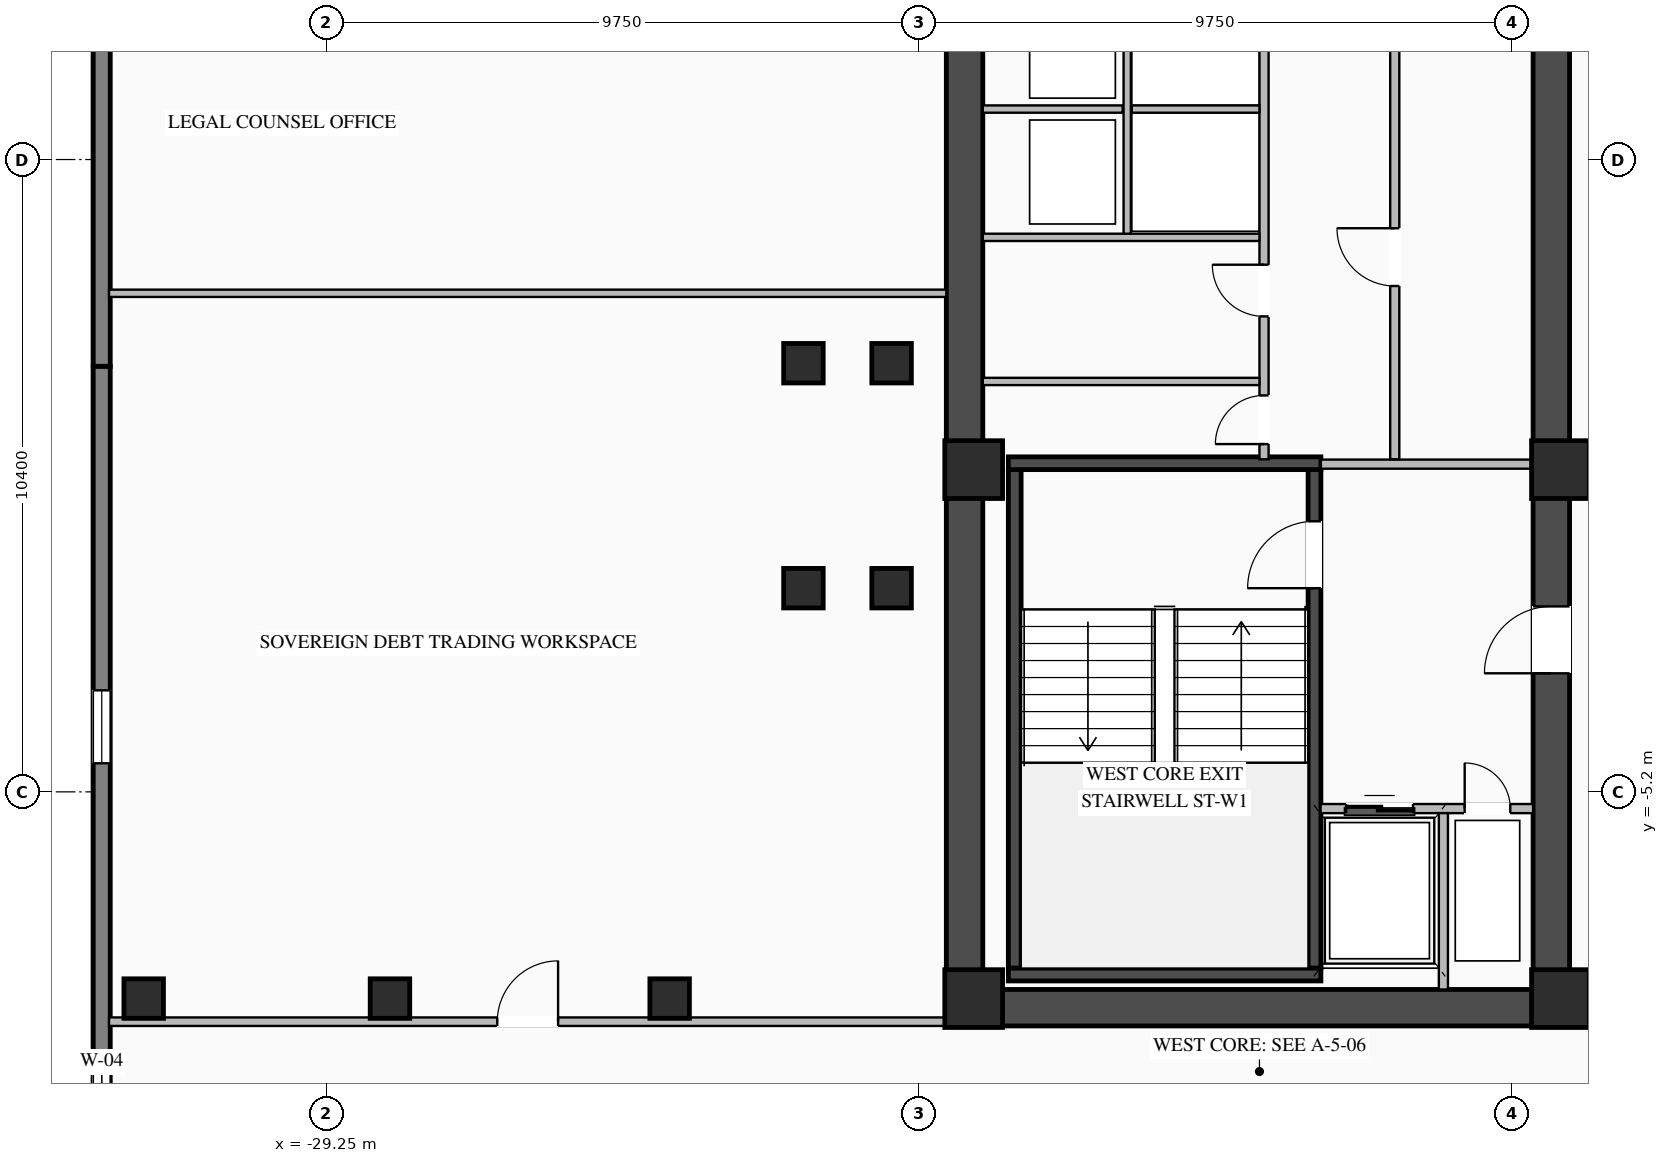
"""IFC4 building model, lengths in metres.
Left out: names, types, materials, properties, quantities, classifications, styles, units other than length and angle.
Written with IfcOpenShell. Run it as: python <this file> out.ifc"""

import sys

from ifc_helpers import new_model, si_unit, direction, frame, frame_2d, origin, origin_2d, place, context, subcontext, project, spatial, rectangle, i_section, extrude, element, fill, save


model = new_model("IFC4")
c1 = context("Model", 3, precision=1e-05, world=origin(), true_north=direction((0.0, 1.0)))
c2 = subcontext(c1, "Body", "Model", "MODEL_VIEW")
j1 = project(units=[si_unit("LENGTHUNIT", "METRE"), si_unit("PLANEANGLEUNIT", "RADIAN")], contexts=[c1])
p1 = place(None, origin())
s1 = spatial("IfcSite", under=j1, at=p1, CompositionType="ELEMENT")
p2 = place(p1, origin())
s2 = spatial("IfcBuilding", under=s1, at=p2, CompositionType="ELEMENT")
p3 = place(p2, frame((0.0, 0.0, 120.85)))
s3 = spatial("IfcBuildingStorey", under=s2, at=p3, CompositionType="ELEMENT", Elevation=120.85)
p4 = place(p3, frame((-19.05, -8.75, 0.0), z_axis=(0.0, 0.0, 1.0), x_axis=(1.0, 0.0, 0.0)))
e1 = element("IfcWall", 1, at=p4, inside=s3, PredefinedType="SHEAR", context=c2, shape_type="SweptSolid", body=[
    extrude(rectangle(XDim=10.25, YDim=0.6, at=frame_2d((5.125, 0.0))), origin(), (0.0, 0.0, 1.0), 3.27),
])
p5 = place(p3, frame((-18.75, -8.45, 0.0), z_axis=(0.0, 0.0, 1.0), x_axis=(0.0, 1.0, 0.0)))
e2 = element("IfcWall", 2, at=p5, inside=s3, PredefinedType="SHEAR", context=c2, shape_type="SweptSolid", body=[
    extrude(rectangle(XDim=16.9, YDim=0.6, at=frame_2d((8.45, 0.0))), origin(), (0.0, 0.0, 1.0), 3.27),
])
p6 = place(p3, frame((-9.1, -8.45, 0.0), z_axis=(0.0, 0.0, 1.0), x_axis=(0.0, 1.0, 0.0)))
e3 = element("IfcWall", 3, at=p6, inside=s3, PredefinedType="SHEAR", context=c2, shape_type="SweptSolid", body=[
    extrude(rectangle(XDim=16.9, YDim=0.6, at=frame_2d((8.45, 0.0))), origin(), (0.0, 0.0, 1.0), 3.27),
])
p7 = place(p6, frame((5.2, 0.0, 0.0)))
e4 = element("IfcOpeningElement", 4, at=p7, cuts=e3, PredefinedType="OPENING", context=c2, shape_type="SweptSolid", body=[
    extrude(rectangle(XDim=1.1, YDim=2.08, at=frame_2d((0.55, 1.04))), frame((0.0, 0.31, 0.0), z_axis=(0.0, -1.0, 0.0), x_axis=(1.0, 0.0, 0.0)), (0.0, 0.0, 1.0), 0.62),
])
p8 = place(p3, frame((-12.995, -8.1, 0.0), z_axis=(0.0, 0.0, 1.0), x_axis=(0.0, 1.0, 0.0)))
e5 = element("IfcWall", 5, at=p8, inside=s3, PredefinedType="SHEAR", context=c2, shape_type="SweptSolid", body=[
    extrude(rectangle(XDim=8.2, YDim=0.21, at=frame_2d((4.1, 0.0))), origin(), (0.0, 0.0, 1.0), 3.27),
])
p9 = place(p8, frame((6.25, 0.0, 0.0)))
e6 = element("IfcOpeningElement", 6, at=p9, cuts=e5, PredefinedType="OPENING", context=c2, shape_type="SweptSolid", body=[
    extrude(rectangle(XDim=1.1, YDim=2.15, at=frame_2d((0.55, 1.075))), frame((0.0, 0.115, 0.0), z_axis=(0.0, -1.0, 0.0), x_axis=(1.0, 0.0, 0.0)), (0.0, 0.0, 1.0), 0.23),
])
p10 = place(p3, frame((-17.925, -8.1, 0.0), z_axis=(0.0, 0.0, 1.0), x_axis=(0.0, 1.0, 0.0)))
e7 = element("IfcWall", 7, at=p10, inside=s3, PredefinedType="SHEAR", context=c2, shape_type="SweptSolid", body=[
    extrude(rectangle(XDim=8.2, YDim=0.21, at=frame_2d((4.1, 0.0))), origin(), (0.0, 0.0, 1.0), 3.27),
])
for number, where, z_axis, x_axis in (
    (8, (-18.03, -8.205, 0.0), (0.0, 0.0, 1.0), (1.0, 0.0, 0.0)),
    (9, (-12.89, 0.205, 0.0), (0.0, 0.0, 1.0), (-1.0, 0.0, 0.0)),
):
    element("IfcWall", number, at=place(p3, frame(where, z_axis=z_axis, x_axis=x_axis)), inside=s3, PredefinedType="SHEAR", context=c2, shape_type="SweptSolid", body=[
        extrude(rectangle(XDim=5.14, YDim=0.21, at=frame_2d((2.57, 0.0))), origin(), (0.0, 0.0, 1.0), 3.27),
    ])
for number, where, z_axis, x_axis in (
    (10, (-8.95, -8.6, 0.0), (0.0, 0.0, 1.0), (1.0, 0.0, 0.0)),
    (11, (-8.95, 0.1, 0.0), (0.0, 0.0, 1.0), (1.0, 0.0, 0.0)),
    (12, (-18.6, -8.6, 0.0), (0.0, 0.0, 1.0), (1.0, 0.0, 0.0)),
    (13, (-18.6, 0.1, 0.0), (0.0, 0.0, 1.0), (1.0, 0.0, 0.0)),
):
    element("IfcColumn", number, at=place(p3, frame(where, z_axis=z_axis, x_axis=x_axis)), inside=s3, PredefinedType="COLUMN", context=c2, shape_type="SweptSolid", body=[
        extrude(rectangle(XDim=0.95, YDim=0.95, at=origin_2d()), origin(), (0.0, 0.0, 1.0), 3.45),
    ])
for number, where, z_axis, x_axis in (
    (14, (-21.4, -1.85, 0.0), (0.0, 0.0, 1.0), (1.0, 0.0, 0.0)),
    (15, (-21.4, 1.85, 0.0), (0.0, 0.0, 1.0), (1.0, 0.0, 0.0)),
    (16, (-19.95, -1.85, 0.0), (0.0, 0.0, 1.0), (1.0, 0.0, 0.0)),
    (17, (-19.95, 1.85, 0.0), (0.0, 0.0, 1.0), (1.0, 0.0, 0.0)),
    (18, (-23.6, -8.6, 0.0), (0.0, 0.0, 1.0), (1.0, 0.0, 0.0)),
    (19, (-28.2, -8.6, 0.0), (0.0, 0.0, 1.0), (1.0, 0.0, 0.0)),
    (20, (-32.25, -8.6, 0.0), (0.0, 0.0, 1.0), (1.0, 0.0, 0.0)),
):
    element("IfcColumn", number, at=place(p3, frame(where, z_axis=z_axis, x_axis=x_axis)), inside=s3, PredefinedType="COLUMN", context=c2, shape_type="SweptSolid", body=[
        extrude(i_section(OverallWidth=0.65, OverallDepth=0.65, WebThickness=0.028, FlangeThickness=0.04, at=origin_2d()), origin(), (0.0, 0.0, 1.0), 3.45),
    ])
p11 = place(p3, frame((-32.94, -15.99, 0.0), z_axis=(0.0, 0.0, 1.0), x_axis=(0.0, 1.0, 0.0)))
e21 = element("IfcWall", 21, at=p11, inside=s3, PredefinedType="STANDARD", context=c2, shape_type="SweptSolid", body=[
    extrude(rectangle(XDim=17.79, YDim=0.28, at=frame_2d((8.895, 0.0))), origin(), (0.0, 0.0, 1.0), 3.25),
])
p12 = place(p11, frame((5.33, 0.0, 0.76)))
e22 = element("IfcOpeningElement", 22, at=p12, cuts=e21, PredefinedType="OPENING", context=c2, shape_type="SweptSolid", body=[
    extrude(rectangle(XDim=1.2, YDim=1.95, at=frame_2d((0.6, 0.975))), frame((0.0, 0.15, 0.0), z_axis=(0.0, -1.0, 0.0), x_axis=(1.0, 0.0, 0.0)), (0.0, 0.0, 1.0), 0.3),
])
p13 = place(p11, frame((11.26, 0.0, 0.76)))
e23 = element("IfcOpeningElement", 23, at=p13, cuts=e21, PredefinedType="OPENING", context=c2, shape_type="SweptSolid", body=[
    extrude(rectangle(XDim=1.2, YDim=1.95, at=frame_2d((0.6, 0.975))), frame((0.0, 0.15, 0.0), z_axis=(0.0, -1.0, 0.0), x_axis=(1.0, 0.0, 0.0)), (0.0, 0.0, 1.0), 0.3),
])
p14 = place(p3, frame((-32.94, 1.8, 0.0), z_axis=(0.0, 0.0, 1.0), x_axis=(0.0, 1.0, 0.0)))
e24 = element("IfcWall", 24, at=p14, inside=s3, PredefinedType="STANDARD", context=c2, shape_type="SweptSolid", body=[
    extrude(rectangle(XDim=17.79, YDim=0.28, at=frame_2d((8.895, 0.0))), origin(), (0.0, 0.0, 1.0), 3.25),
])
p15 = place(p14, frame((5.33, 0.0, 0.76)))
e25 = element("IfcOpeningElement", 25, at=p15, cuts=e24, PredefinedType="OPENING", context=c2, shape_type="SweptSolid", body=[
    extrude(rectangle(XDim=1.2, YDim=1.95, at=frame_2d((0.6, 0.975))), frame((0.0, 0.15, 0.0), z_axis=(0.0, -1.0, 0.0), x_axis=(1.0, 0.0, 0.0)), (0.0, 0.0, 1.0), 0.3),
])
p16 = place(p14, frame((11.26, 0.0, 0.76)))
e26 = element("IfcOpeningElement", 26, at=p16, cuts=e24, PredefinedType="OPENING", context=c2, shape_type="SweptSolid", body=[
    extrude(rectangle(XDim=1.2, YDim=1.95, at=frame_2d((0.6, 0.975))), frame((0.0, 0.15, 0.0), z_axis=(0.0, -1.0, 0.0), x_axis=(1.0, 0.0, 0.0)), (0.0, 0.0, 1.0), 0.3),
])
p17 = place(p3, frame((-12.895, -5.475, 0.0), z_axis=(0.0, 0.0, 1.0), x_axis=(1.0, 0.0, 0.0)))
e27 = element("IfcWall", 27, at=p17, inside=s3, PredefinedType="STANDARD", context=c2, shape_type="SweptSolid", body=[
    extrude(rectangle(XDim=3.495, YDim=0.15, at=frame_2d((1.748, 0.0))), origin(), (0.0, 0.0, 1.0), 3.25),
])
p18 = place(p17, frame((0.42, 0.0, 0.0)))
e28 = element("IfcOpeningElement", 28, at=p18, cuts=e27, PredefinedType="OPENING", context=c2, shape_type="SweptSolid", body=[
    extrude(rectangle(XDim=1.1, YDim=2.15, at=frame_2d((0.55, 1.075))), frame((0.0, 0.085, 0.0), z_axis=(0.0, -1.0, 0.0), x_axis=(1.0, 0.0, 0.0)), (0.0, 0.0, 1.0), 0.17),
])
p19 = place(p17, frame((2.37, 0.0, 0.0)))
e29 = element("IfcOpeningElement", 29, at=p19, cuts=e27, PredefinedType="OPENING", context=c2, shape_type="SweptSolid", body=[
    extrude(rectangle(XDim=0.75, YDim=2.05, at=frame_2d((0.375, 1.025))), frame((0.0, 0.085, 0.0), z_axis=(0.0, -1.0, 0.0), x_axis=(1.0, 0.0, 0.0)), (0.0, 0.0, 1.0), 0.17),
])
p20 = place(p3, frame((-10.875, -8.45, 0.0), z_axis=(0.0, 0.0, 1.0), x_axis=(0.0, 1.0, 0.0)))
e30 = element("IfcWall", 30, at=p20, inside=s3, PredefinedType="STANDARD", context=c2, shape_type="SweptSolid", body=[
    extrude(rectangle(XDim=2.9, YDim=0.15, at=frame_2d((1.45, 0.0))), origin(), (0.0, 0.0, 1.0), 3.25),
])
p21 = place(p3, frame((-12.89, 0.19, 0.0), z_axis=(0.0, 0.0, 1.0), x_axis=(1.0, 0.0, 0.0)))
e31 = element("IfcWall", 31, at=p21, inside=s3, PredefinedType="STANDARD", context=c2, shape_type="SweptSolid", body=[
    extrude(rectangle(XDim=3.49, YDim=0.15, at=frame_2d((1.745, 0.0))), origin(), (0.0, 0.0, 1.0), 2.645),
])
p22 = place(p3, frame((-11.675, 0.27, 0.0), z_axis=(0.0, 0.0, 1.0), x_axis=(0.0, 1.0, 0.0)))
e32 = element("IfcWall", 32, at=p22, inside=s3, PredefinedType="STANDARD", context=c2, shape_type="SweptSolid", body=[
    extrude(rectangle(XDim=8.18, YDim=0.15, at=frame_2d((4.09, 0.0))), origin(), (0.0, 0.0, 1.0), 3.25),
])
p23 = place(p22, frame((2.85, 0.0, 0.0)))
e33 = element("IfcOpeningElement", 33, at=p23, cuts=e32, PredefinedType="OPENING", context=c2, shape_type="SweptSolid", body=[
    extrude(rectangle(XDim=0.95, YDim=2.05, at=frame_2d((0.475, 1.025))), frame((0.0, 0.085, 0.0), z_axis=(0.0, -1.0, 0.0), x_axis=(1.0, 0.0, 0.0)), (0.0, 0.0, 1.0), 0.17),
])
p24 = place(p3, frame((-13.825, 0.27, 0.0), z_axis=(0.0, 0.0, 1.0), x_axis=(0.0, 1.0, 0.0)))
e34 = element("IfcWall", 34, at=p24, inside=s3, PredefinedType="STANDARD", context=c2, shape_type="SweptSolid", body=[
    extrude(rectangle(XDim=8.18, YDim=0.15, at=frame_2d((4.09, 0.0))), origin(), (0.0, 0.0, 1.0), 3.25),
])
p25 = place(p24, frame((0.25, 0.0, 0.0)))
e35 = element("IfcOpeningElement", 35, at=p25, cuts=e34, PredefinedType="OPENING", context=c2, shape_type="SweptSolid", body=[
    extrude(rectangle(XDim=0.8, YDim=2.05, at=frame_2d((0.4, 1.025))), frame((0.0, 0.085, 0.0), z_axis=(0.0, -1.0, 0.0), x_axis=(1.0, 0.0, 0.0)), (0.0, 0.0, 1.0), 0.17),
])
p26 = place(p24, frame((2.35, 0.0, 0.0)))
e36 = element("IfcOpeningElement", 36, at=p26, cuts=e34, PredefinedType="OPENING", context=c2, shape_type="SweptSolid", body=[
    extrude(rectangle(XDim=0.85, YDim=2.05, at=frame_2d((0.425, 1.025))), frame((0.0, 0.085, 0.0), z_axis=(0.0, -1.0, 0.0), x_axis=(1.0, 0.0, 0.0)), (0.0, 0.0, 1.0), 0.17),
])
p27 = place(p3, frame((-18.45, 3.92, 0.0), z_axis=(0.0, 0.0, 1.0), x_axis=(1.0, 0.0, 0.0)))
e37 = element("IfcWall", 37, at=p27, inside=s3, PredefinedType="STANDARD", context=c2, shape_type="SweptSolid", body=[
    extrude(rectangle(XDim=4.55, YDim=0.12, at=frame_2d((2.275, 0.0))), origin(), (0.0, 0.0, 1.0), 3.25),
])
p28 = place(p3, frame((-18.45, 6.03, 0.0), z_axis=(0.0, 0.0, 1.0), x_axis=(1.0, 0.0, 0.0)))
e38 = element("IfcWall", 38, at=p28, inside=s3, PredefinedType="STANDARD", context=c2, shape_type="SweptSolid", body=[
    extrude(rectangle(XDim=2.3, YDim=0.12, at=frame_2d((1.15, 0.0))), origin(), (0.0, 0.0, 1.0), 3.25),
])
p29 = place(p3, frame((-16.075, 3.98, 0.0), z_axis=(0.0, 0.0, 1.0), x_axis=(0.0, 1.0, 0.0)))
e39 = element("IfcWall", 39, at=p29, inside=s3, PredefinedType="STANDARD", context=c2, shape_type="SweptSolid", body=[
    extrude(rectangle(XDim=4.47, YDim=0.12, at=frame_2d((2.235, 0.0))), origin(), (0.0, 0.0, 1.0), 3.25),
])
p30 = place(p3, frame((-16.0, 6.03, 0.0), z_axis=(0.0, 0.0, 1.0), x_axis=(1.0, 0.0, 0.0)))
e40 = element("IfcWall", 40, at=p30, inside=s3, PredefinedType="STANDARD", context=c2, shape_type="SweptSolid", body=[
    extrude(rectangle(XDim=2.1, YDim=0.12, at=frame_2d((1.05, 0.0))), origin(), (0.0, 0.0, 1.0), 3.25),
])
p31 = place(p3, frame((-18.45, 1.55, 0.0), z_axis=(0.0, 0.0, 1.0), x_axis=(1.0, 0.0, 0.0)))
e41 = element("IfcWall", 41, at=p31, inside=s3, PredefinedType="STANDARD", context=c2, shape_type="SweptSolid", body=[
    extrude(rectangle(XDim=4.55, YDim=0.12, at=frame_2d((2.275, 0.0))), origin(), (0.0, 0.0, 1.0), 3.25),
])
p32 = place(p3, frame((-32.82, -8.98, 0.0), z_axis=(0.0, 0.0, 1.0), x_axis=(1.0, 0.0, 0.0)))
e42 = element("IfcWall", 42, at=p32, inside=s3, PredefinedType="STANDARD", context=c2, shape_type="SweptSolid", body=[
    extrude(rectangle(XDim=13.77, YDim=0.14, at=frame_2d((6.885, 0.0))), origin(), (0.0, 0.0, 1.0), 3.25),
])
p33 = place(p32, frame((6.385, 0.0, 0.0)))
e43 = element("IfcOpeningElement", 43, at=p33, cuts=e42, PredefinedType="OPENING", context=c2, shape_type="SweptSolid", body=[
    extrude(rectangle(XDim=1.0, YDim=2.08, at=frame_2d((0.5, 1.04))), frame((0.0, 0.08, 0.0), z_axis=(0.0, -1.0, 0.0), x_axis=(1.0, 0.0, 0.0)), (0.0, 0.0, 1.0), 0.16),
])
p34 = place(p3, frame((-32.82, 3.0, 0.0), z_axis=(0.0, 0.0, 1.0), x_axis=(1.0, 0.0, 0.0)))
e44 = element("IfcWall", 44, at=p34, inside=s3, PredefinedType="STANDARD", context=c2, shape_type="SweptSolid", body=[
    extrude(rectangle(XDim=13.77, YDim=0.12, at=frame_2d((6.885, 0.0))), origin(), (0.0, 0.0, 1.0), 3.25),
])
p35 = place(p12, origin())
e45 = element("IfcWindow", 45, at=p35, inside=s3, PartitioningType="SINGLE_PANEL", PredefinedType="WINDOW", context=c2, shape_type="SweptSolid", body=[
    extrude(rectangle(XDim=1.2, YDim=1.95, at=frame_2d((0.6, 0.975))), frame((0.0, 0.03, 0.0), z_axis=(0.0, -1.0, 0.0), x_axis=(1.0, 0.0, 0.0)), (0.0, 0.0, 1.0), 0.06),
])
fill(e22, e45)
p36 = place(p13, origin())
e46 = element("IfcWindow", 46, at=p36, inside=s3, PartitioningType="SINGLE_PANEL", PredefinedType="WINDOW", context=c2, shape_type="SweptSolid", body=[
    extrude(rectangle(XDim=1.2, YDim=1.95, at=frame_2d((0.6, 0.975))), frame((0.0, 0.03, 0.0), z_axis=(0.0, -1.0, 0.0), x_axis=(1.0, 0.0, 0.0)), (0.0, 0.0, 1.0), 0.06),
])
fill(e23, e46)
p37 = place(p9, origin())
e47 = element("IfcDoor", 47, at=p37, inside=s3, OperationType="SINGLE_SWING_LEFT", PredefinedType="DOOR", context=c2, shape_type="SweptSolid", body=[
    extrude(rectangle(XDim=1.1, YDim=2.15, at=frame_2d((0.55, 1.075))), frame((0.0, 0.025, 0.0), z_axis=(0.0, -1.0, 0.0), x_axis=(1.0, 0.0, 0.0)), (0.0, 0.0, 1.0), 0.05),
])
fill(e6, e47)
p38 = place(p18, origin())
e48 = element("IfcDoor", 48, at=p38, inside=s3, OperationType="DOUBLE_DOOR_SLIDING", PredefinedType="DOOR", context=c2, shape_type="SweptSolid", body=[
    extrude(rectangle(XDim=1.1, YDim=2.15, at=frame_2d((0.55, 1.075))), frame((0.0, 0.025, 0.0), z_axis=(0.0, -1.0, 0.0), x_axis=(1.0, 0.0, 0.0)), (0.0, 0.0, 1.0), 0.05),
])
fill(e28, e48)
p39 = place(p19, origin())
e49 = element("IfcDoor", 49, at=p39, inside=s3, OperationType="SINGLE_SWING_LEFT", PredefinedType="DOOR", context=c2, shape_type="SweptSolid", body=[
    extrude(rectangle(XDim=0.75, YDim=2.05, at=frame_2d((0.375, 1.025))), frame((0.0, 0.025, 0.0), z_axis=(0.0, -1.0, 0.0), x_axis=(1.0, 0.0, 0.0)), (0.0, 0.0, 1.0), 0.05),
])
fill(e29, e49)
p40 = place(p7, origin())
e50 = element("IfcDoor", 50, at=p40, inside=s3, OperationType="SINGLE_SWING_LEFT", PredefinedType="DOOR", context=c2, shape_type="SweptSolid", body=[
    extrude(rectangle(XDim=1.1, YDim=2.08, at=frame_2d((0.55, 1.04))), frame((0.0, 0.255, 0.0), z_axis=(0.0, -1.0, 0.0), x_axis=(1.0, 0.0, 0.0)), (0.0, 0.0, 1.0), 0.05),
])
fill(e4, e50)
p41 = place(p23, origin())
e51 = element("IfcDoor", 51, at=p41, inside=s3, OperationType="SINGLE_SWING_RIGHT", PredefinedType="DOOR", context=c2, shape_type="SweptSolid", body=[
    extrude(rectangle(XDim=0.95, YDim=2.05, at=frame_2d((0.475, 1.025))), frame((0.0, 0.025, 0.0), z_axis=(0.0, -1.0, 0.0), x_axis=(1.0, 0.0, 0.0)), (0.0, 0.0, 1.0), 0.05),
])
fill(e33, e51)
p42 = place(p25, origin())
e52 = element("IfcDoor", 52, at=p42, inside=s3, OperationType="SINGLE_SWING_LEFT", PredefinedType="DOOR", context=c2, shape_type="SweptSolid", body=[
    extrude(rectangle(XDim=0.8, YDim=2.05, at=frame_2d((0.4, 1.025))), frame((0.0, 0.025, 0.0), z_axis=(0.0, -1.0, 0.0), x_axis=(1.0, 0.0, 0.0)), (0.0, 0.0, 1.0), 0.05),
])
fill(e35, e52)
p43 = place(p26, origin())
e53 = element("IfcDoor", 53, at=p43, inside=s3, OperationType="SINGLE_SWING_RIGHT", PredefinedType="DOOR", context=c2, shape_type="SweptSolid", body=[
    extrude(rectangle(XDim=0.85, YDim=2.05, at=frame_2d((0.425, 1.025))), frame((0.0, 0.025, 0.0), z_axis=(0.0, -1.0, 0.0), x_axis=(1.0, 0.0, 0.0)), (0.0, 0.0, 1.0), 0.05),
])
fill(e36, e53)
p44 = place(p33, origin())
e54 = element("IfcDoor", 54, at=p44, inside=s3, OperationType="SINGLE_SWING_RIGHT", PredefinedType="DOOR", context=c2, shape_type="SweptSolid", body=[
    extrude(rectangle(XDim=1.0, YDim=2.08, at=frame_2d((0.5, 1.04))), frame((0.0, 0.025, 0.0), z_axis=(0.0, -1.0, 0.0), x_axis=(1.0, 0.0, 0.0)), (0.0, 0.0, 1.0), 0.05),
])
fill(e43, e54)
save(model, sys.argv[1])
